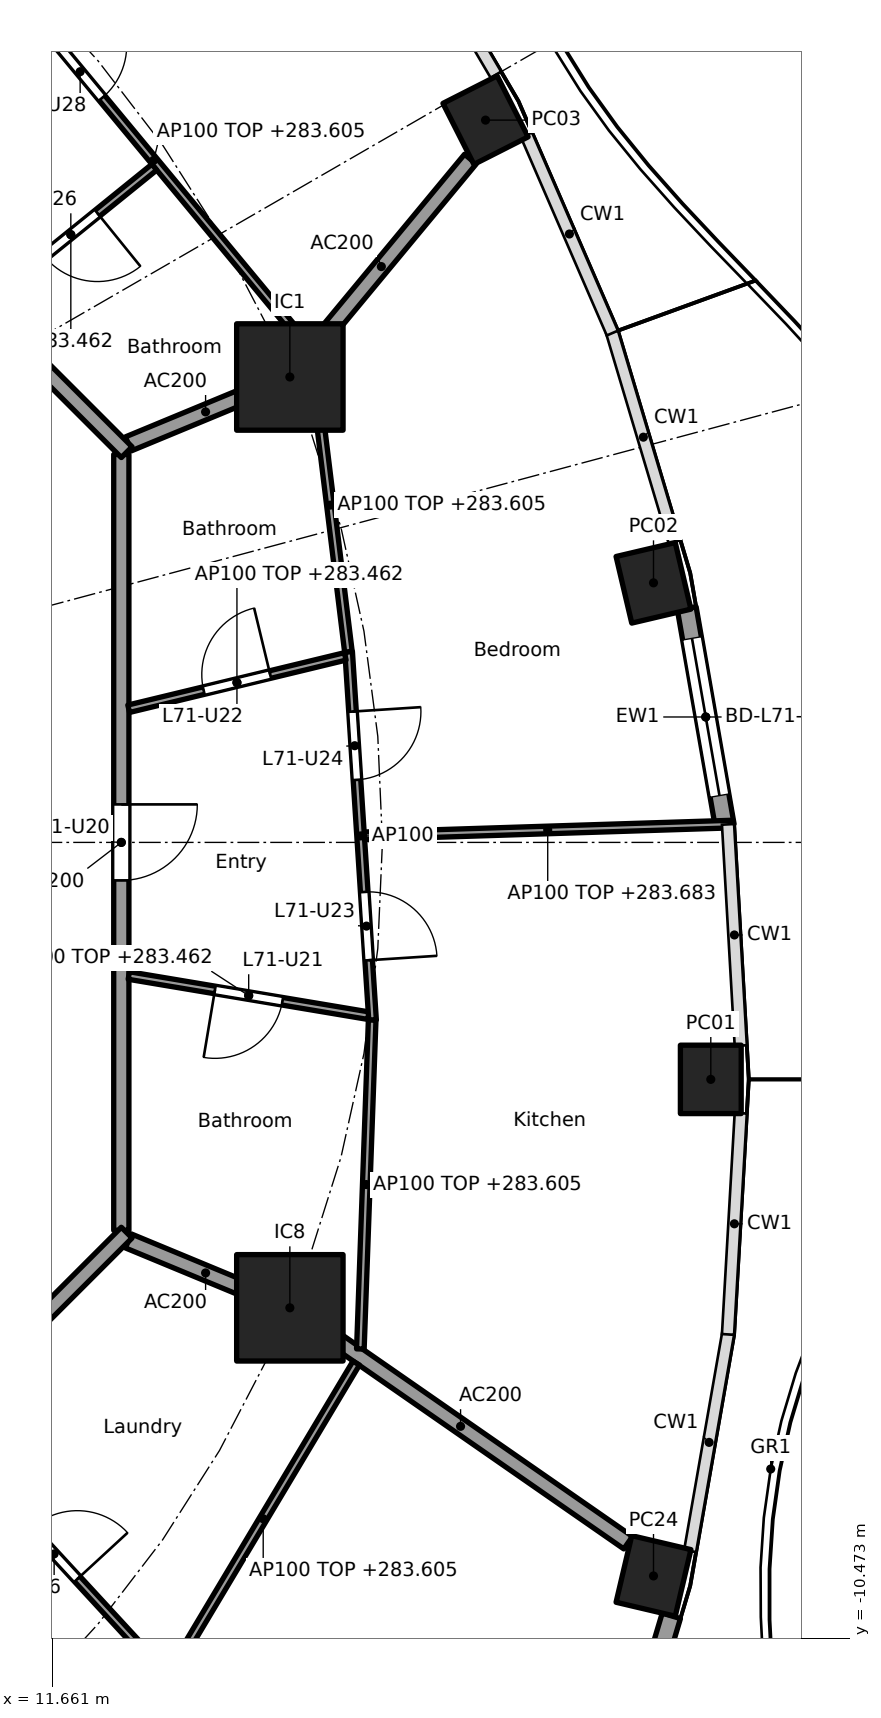
"""IFC4 building model, lengths in metres.
Left out: names, types, materials, properties, quantities, classifications, styles, units other than length and angle.
Written with IfcOpenShell. Run it as: python <this file> out.ifc"""

import sys

from ifc_helpers import new_model, si_unit, direction, frame, frame_2d, origin, origin_2d, place, context, subcontext, project, spatial, rectangle, hollow_rectangle, extrude, element, fill, save


model = new_model("IFC4")
c1 = context("Model", 3, precision=1e-05, world=origin(), true_north=direction((0.0, 1.0)))
c2 = subcontext(c1, "Body", "Model", "MODEL_VIEW")
j1 = project(units=[si_unit("LENGTHUNIT", "METRE"), si_unit("PLANEANGLEUNIT", "RADIAN")], contexts=[c1])
p1 = place(None, origin())
s1 = spatial("IfcSite", under=j1, at=p1, CompositionType="ELEMENT")
p2 = place(p1, origin())
s2 = spatial("IfcBuilding", under=s1, at=p2, CompositionType="ELEMENT")
p3 = place(p2, frame((0.0, 0.0, 280.7)))
s3 = spatial("IfcBuildingStorey", under=s2, at=p3, CompositionType="ELEMENT", Elevation=280.7)
for number, where, z_axis, x_axis in (
    (1, (20.32, -3.118, 0.0), (0.0, 0.0, 1.0), (0.0, 1.0, 0.0)),
    (2, (19.566, 3.415, 0.0), (0.0, 0.0, 1.0), (-0.229, 0.973, 0.0)),
    (3, (17.356, 9.502, 0.0), (0.0, 0.0, 1.0), (-0.452, 0.892, 0.0)),
    (4, (19.566, -9.65, 0.0), (0.0, 0.0, 1.0), (0.229, 0.973, 0.0)),
):
    element("IfcColumn", number, at=place(p3, frame(where, z_axis=z_axis, x_axis=x_axis)), inside=s3, PredefinedType="COLUMN", context=c2, shape_type="SweptSolid", body=[
        extrude(hollow_rectangle(XDim=0.9, YDim=0.8, WallThickness=0.028, at=origin_2d()), origin(), (0.0, 0.0, 1.0), 3.7),
    ])
for number, where, z_axis, x_axis in (
    (5, (14.782, 6.123, 0.0), (0.0, 0.0, 1.0), (1.0, 0.0, 0.0)),
    (6, (14.782, -6.123, 0.0), (0.0, 0.0, 1.0), (1.0, 0.0, 0.0)),
):
    element("IfcColumn", number, at=place(p3, frame(where, z_axis=z_axis, x_axis=x_axis)), inside=s3, PredefinedType="COLUMN", context=c2, shape_type="SweptSolid", body=[
        extrude(rectangle(XDim=1.4, YDim=1.4, at=origin_2d()), origin(), (0.0, 0.0, 1.0), 3.7),
    ])
p4 = place(p3, frame((20.004, 3.08, 0.0), z_axis=(0.0, 0.0, 1.0), x_axis=(0.172182411767, -0.985065082661, 0.0)))
e7 = element("IfcWall", 7, at=p4, inside=s3, PredefinedType="SOLIDWALL", context=c2, shape_type="SweptSolid", body=[
    extrude(rectangle(XDim=2.903, YDim=0.25, at=frame_2d((1.451, 0.0))), origin(), (0.0, 0.0, 1.0), 3.44),
])
p5 = place(p4, frame((0.401, 0.0, 0.0)))
e8 = element("IfcOpeningElement", 8, at=p5, cuts=e7, PredefinedType="OPENING", context=c2, shape_type="SweptSolid", body=[
    extrude(rectangle(XDim=2.1, YDim=2.4, at=frame_2d((1.05, 1.2))), frame((0.0, 0.135, 0.0), z_axis=(0.0, -1.0, 0.0), x_axis=(1.0, 0.0, 0.0)), (0.0, 0.0, 1.0), 0.27),
])
p6 = place(p3, frame((19.801, -10.175, 0.0), z_axis=(0.0, 0.0, 1.0), x_axis=(-0.285899456462, -0.958259620768, 0.0)))
e9 = element("IfcWall", 9, at=p6, inside=s3, PredefinedType="SOLIDWALL", context=c2, shape_type="SweptSolid", body=[
    extrude(rectangle(XDim=2.877, YDim=0.25, at=frame_2d((1.438, 0.0))), origin(), (0.0, 0.0, 1.0), 3.44),
])
p7 = place(p6, frame((0.389, 0.0, 0.0)))
e10 = element("IfcOpeningElement", 10, at=p7, cuts=e9, PredefinedType="OPENING", context=c2, shape_type="SweptSolid", body=[
    extrude(rectangle(XDim=2.1, YDim=2.4, at=frame_2d((1.05, 1.2))), frame((0.0, 0.135, 0.0), z_axis=(0.0, -1.0, 0.0), x_axis=(1.0, 0.0, 0.0)), (0.0, 0.0, 1.0), 0.27),
])
p8 = place(p3, frame((12.657, 5.243, 0.0), z_axis=(0.0, 0.0, 1.0), x_axis=(0.923853160736, 0.382747093259, 0.0)))
e11 = element("IfcWall", 11, at=p8, inside=s3, PredefinedType="PARTITIONING", context=c2, shape_type="SweptSolid", body=[
    extrude(rectangle(XDim=2.2, YDim=0.2, at=frame_2d((1.1, 0.0))), origin(), (0.0, 0.0, 1.0), 3.44),
])
p9 = place(p3, frame((14.814, 6.161, 0.0), z_axis=(0.0, 0.0, 1.0), x_axis=(0.638050520313, 0.769994502272, 0.0)))
e12 = element("IfcWall", 12, at=p9, inside=s3, PredefinedType="PARTITIONING", context=c2, shape_type="SweptSolid", body=[
    extrude(rectangle(XDim=3.673, YDim=0.2, at=frame_2d((1.836, 0.0))), origin(), (0.0, 0.0, 1.0), 3.44),
])
p10 = place(p3, frame((12.657, -5.243, 0.0), z_axis=(0.0, 0.0, 1.0), x_axis=(0.92383017907, -0.382802560388, 0.0)))
e13 = element("IfcWall", 13, at=p10, inside=s3, PredefinedType="PARTITIONING", context=c2, shape_type="SweptSolid", body=[
    extrude(rectangle(XDim=2.2, YDim=0.2, at=frame_2d((1.1, 0.0))), origin(), (0.0, 0.0, 1.0), 3.44),
])
p11 = place(p3, frame((14.823, -6.151, 0.0), z_axis=(0.0, 0.0, 1.0), x_axis=(0.821435065081, -0.570302054928, 0.0)))
e14 = element("IfcWall", 14, at=p11, inside=s3, PredefinedType="PARTITIONING", context=c2, shape_type="SweptSolid", body=[
    extrude(rectangle(XDim=5.368, YDim=0.2, at=frame_2d((2.684, 0.0))), origin(), (0.0, 0.0, 1.0), 3.44),
])
p12 = place(p3, frame((12.565, -5.104, 0.0), z_axis=(0.0, 0.0, 1.0), x_axis=(0.0, 1.0, 0.0)))
e15 = element("IfcWall", 15, at=p12, inside=s3, PredefinedType="PARTITIONING", context=c2, shape_type="SweptSolid", body=[
    extrude(rectangle(XDim=10.209, YDim=0.2, at=frame_2d((5.104, 0.0))), origin(), (0.0, 0.0, 1.0), 3.44),
])
p13 = place(p12, frame((4.604, 0.0, 0.0)))
e16 = element("IfcOpeningElement", 16, at=p13, cuts=e15, PredefinedType="OPENING", context=c2, shape_type="SweptSolid", body=[
    extrude(rectangle(XDim=1.0, YDim=2.1, at=frame_2d((0.5, 1.05))), frame((0.0, 0.11, 0.0), z_axis=(0.0, -1.0, 0.0), x_axis=(1.0, 0.0, 0.0)), (0.0, 0.0, 1.0), 0.22),
])
p14 = place(p3, frame((12.635, 5.134, 0.0), z_axis=(0.0, 0.0, 1.0), x_axis=(-0.707106781187, 0.707106781187, 0.0)))
e17 = element("IfcWall", 17, at=p14, inside=s3, PredefinedType="PARTITIONING", context=c2, shape_type="SweptSolid", body=[
    extrude(rectangle(XDim=10.609, YDim=0.2, at=frame_2d((5.305, 0.0))), origin(), (0.0, 0.0, 1.0), 3.44),
])
p15 = place(p14, frame((4.804, 0.0, 0.0)))
e18 = element("IfcOpeningElement", 18, at=p15, cuts=e17, PredefinedType="OPENING", context=c2, shape_type="SweptSolid", body=[
    extrude(rectangle(XDim=1.0, YDim=2.1, at=frame_2d((0.5, 1.05))), frame((0.0, 0.11, 0.0), z_axis=(0.0, -1.0, 0.0), x_axis=(1.0, 0.0, 0.0)), (0.0, 0.0, 1.0), 0.22),
])
p16 = place(p3, frame((5.275, -12.494, 0.0), z_axis=(0.0, 0.0, 1.0), x_axis=(0.707106781187, 0.707106781187, 0.0)))
e19 = element("IfcWall", 19, at=p16, inside=s3, PredefinedType="PARTITIONING", context=c2, shape_type="SweptSolid", body=[
    extrude(rectangle(XDim=10.409, YDim=0.2, at=frame_2d((5.205, 0.0))), origin(), (0.0, 0.0, 1.0), 3.44),
])
p17 = place(p16, frame((4.604, 0.0, 0.0)))
e20 = element("IfcOpeningElement", 20, at=p17, cuts=e19, PredefinedType="OPENING", context=c2, shape_type="SweptSolid", body=[
    extrude(rectangle(XDim=1.0, YDim=2.1, at=frame_2d((0.5, 1.05))), frame((0.0, 0.11, 0.0), z_axis=(0.0, -1.0, 0.0), x_axis=(1.0, 0.0, 0.0)), (0.0, 0.0, 1.0), 0.22),
])
p18 = place(p3, frame((12.663, -1.751, 0.0), z_axis=(0.0, 0.0, 1.0), x_axis=(0.98626156497, -0.165191178529, 0.0)))
e21 = element("IfcWall", 21, at=p18, inside=s3, PredefinedType="PARTITIONING", context=c2, shape_type="SweptSolid", body=[
    extrude(rectangle(XDim=3.198, YDim=0.1, at=frame_2d((1.599, 0.0))), origin(), (0.0, 0.0, 1.0), 2.762),
])
p19 = place(p18, frame((1.149, 0.0, 0.0)))
e22 = element("IfcOpeningElement", 22, at=p19, cuts=e21, PredefinedType="OPENING", context=c2, shape_type="SweptSolid", body=[
    extrude(rectangle(XDim=0.9, YDim=2.1, at=frame_2d((0.45, 1.05))), frame((0.0, 0.06, 0.0), z_axis=(0.0, -1.0, 0.0), x_axis=(1.0, 0.0, 0.0)), (0.0, 0.0, 1.0), 0.12),
])
p20 = place(p3, frame((15.87, -2.338, 0.0), z_axis=(0.0, 0.0, 1.0), x_axis=(-0.064797294757, 0.997898447034, 0.0)))
e23 = element("IfcWall", 23, at=p20, inside=s3, PredefinedType="PARTITIONING", context=c2, shape_type="SweptSolid", body=[
    extrude(rectangle(XDim=4.857, YDim=0.1, at=frame_2d((2.428, 0.0))), origin(), (0.0, 0.0, 1.0), 3.44),
])
p21 = place(p20, frame((0.789, 0.0, 0.0)))
e24 = element("IfcOpeningElement", 24, at=p21, cuts=e23, PredefinedType="OPENING", context=c2, shape_type="SweptSolid", body=[
    extrude(rectangle(XDim=0.9, YDim=2.1, at=frame_2d((0.45, 1.05))), frame((0.0, 0.06, 0.0), z_axis=(0.0, -1.0, 0.0), x_axis=(1.0, 0.0, 0.0)), (0.0, 0.0, 1.0), 0.12),
])
p22 = place(p20, frame((3.167, 0.0, 0.0)))
e25 = element("IfcOpeningElement", 25, at=p22, cuts=e23, PredefinedType="OPENING", context=c2, shape_type="SweptSolid", body=[
    extrude(rectangle(XDim=0.9, YDim=2.1, at=frame_2d((0.45, 1.05))), frame((0.0, 0.06, 0.0), z_axis=(0.0, -1.0, 0.0), x_axis=(1.0, 0.0, 0.0)), (0.0, 0.0, 1.0), 0.12),
])
p23 = place(p3, frame((15.865, -2.338, 0.0), z_axis=(0.0, 0.0, 1.0), x_axis=(-0.035864509465, -0.999356661538, 0.0)))
e26 = element("IfcWall", 26, at=p23, inside=s3, PredefinedType="PARTITIONING", context=c2, shape_type="SweptSolid", body=[
    extrude(rectangle(XDim=4.329, YDim=0.1, at=frame_2d((2.165, 0.0))), origin(), (0.0, 0.0, 1.0), 2.905),
])
p24 = place(p3, frame((15.763, 0.087, 0.0), z_axis=(0.0, 0.0, 1.0), x_axis=(0.999492034598, 0.03186962151, 0.0)))
e27 = element("IfcWall", 27, at=p24, inside=s3, PredefinedType="PARTITIONING", context=c2, shape_type="SweptSolid", body=[
    extrude(rectangle(XDim=4.826, YDim=0.1, at=frame_2d((2.413, 0.0))), origin(), (0.0, 0.0, 1.0), 2.983),
])
p25 = place(p3, frame((12.662, 1.758, 0.0), z_axis=(0.0, 0.0, 1.0), x_axis=(0.972004827836, 0.234960879007, 0.0)))
e28 = element("IfcWall", 28, at=p25, inside=s3, PredefinedType="PARTITIONING", context=c2, shape_type="SweptSolid", body=[
    extrude(rectangle(XDim=2.93, YDim=0.1, at=frame_2d((1.465, 0.0))), origin(), (0.0, 0.0, 1.0), 2.762),
])
p26 = place(p25, frame((1.015, 0.0, 0.0)))
e29 = element("IfcOpeningElement", 29, at=p26, cuts=e28, PredefinedType="OPENING", context=c2, shape_type="SweptSolid", body=[
    extrude(rectangle(XDim=0.9, YDim=2.1, at=frame_2d((0.45, 1.05))), frame((0.0, 0.06, 0.0), z_axis=(0.0, -1.0, 0.0), x_axis=(1.0, 0.0, 0.0)), (0.0, 0.0, 1.0), 0.12),
])
p27 = place(p3, frame((15.552, 2.508, 0.0), z_axis=(0.0, 0.0, 1.0), x_axis=(-0.12196293976, 0.992534654974, 0.0)))
e30 = element("IfcWall", 30, at=p27, inside=s3, PredefinedType="PARTITIONING", context=c2, shape_type="SweptSolid", body=[
    extrude(rectangle(XDim=3.887, YDim=0.1, at=frame_2d((1.944, 0.0))), origin(), (0.0, 0.0, 1.0), 2.905),
])
p28 = place(p3, frame((15.002, 6.543, 0.0), z_axis=(0.0, 0.0, 1.0), x_axis=(-0.637932656528, 0.770092154054, 0.0)))
e31 = element("IfcWall", 31, at=p28, inside=s3, PredefinedType="PARTITIONING", context=c2, shape_type="SweptSolid", body=[
    extrude(rectangle(XDim=6.311, YDim=0.1, at=frame_2d((3.155, 0.0))), origin(), (0.0, 0.0, 1.0), 2.905),
])
p29 = place(p28, frame((4.22, 0.0, 0.0)))
e32 = element("IfcOpeningElement", 32, at=p29, cuts=e31, PredefinedType="OPENING", context=c2, shape_type="SweptSolid", body=[
    extrude(rectangle(XDim=0.9, YDim=2.1, at=frame_2d((0.45, 1.05))), frame((0.0, 0.06, 0.0), z_axis=(0.0, -1.0, 0.0), x_axis=(1.0, 0.0, 0.0)), (0.0, 0.0, 1.0), 0.12),
])
p30 = place(p3, frame((10.802, 7.107, 0.0), z_axis=(0.0, 0.0, 1.0), x_axis=(0.777526610395, 0.628850037868, 0.0)))
e33 = element("IfcWall", 33, at=p30, inside=s3, PredefinedType="PARTITIONING", context=c2, shape_type="SweptSolid", body=[
    extrude(rectangle(XDim=2.824, YDim=0.1, at=frame_2d((1.412, 0.0))), origin(), (0.0, 0.0, 1.0), 2.762),
])
p31 = place(p30, frame((0.962, 0.0, 0.0)))
e34 = element("IfcOpeningElement", 34, at=p31, cuts=e33, PredefinedType="OPENING", context=c2, shape_type="SweptSolid", body=[
    extrude(rectangle(XDim=0.9, YDim=2.1, at=frame_2d((0.45, 1.05))), frame((0.0, 0.06, 0.0), z_axis=(0.0, -1.0, 0.0), x_axis=(1.0, 0.0, 0.0)), (0.0, 0.0, 1.0), 0.12),
])
p32 = place(p3, frame((7.708, -10.198, 0.0), z_axis=(0.0, 0.0, 1.0), x_axis=(0.503839015963, -0.863797572347, 0.0)))
e35 = element("IfcWall", 35, at=p32, inside=s3, PredefinedType="PARTITIONING", context=c2, shape_type="SweptSolid", body=[
    extrude(rectangle(XDim=11.856, YDim=0.1, at=frame_2d((5.928, 0.0))), origin(), (0.0, 0.0, 1.0), 2.762),
])
p33 = place(p32, frame((2.095, 0.0, 0.0)))
e36 = element("IfcOpeningElement", 36, at=p33, cuts=e35, PredefinedType="OPENING", context=c2, shape_type="SweptSolid", body=[
    extrude(rectangle(XDim=0.9, YDim=2.1, at=frame_2d((0.45, 1.05))), frame((0.0, 0.06, 0.0), z_axis=(0.0, -1.0, 0.0), x_axis=(1.0, 0.0, 0.0)), (0.0, 0.0, 1.0), 0.12),
])
p34 = place(p32, frame((8.023, 0.0, 0.0)))
e37 = element("IfcOpeningElement", 37, at=p34, cuts=e35, PredefinedType="OPENING", context=c2, shape_type="SweptSolid", body=[
    extrude(rectangle(XDim=0.9, YDim=2.1, at=frame_2d((0.45, 1.05))), frame((0.0, 0.06, 0.0), z_axis=(0.0, -1.0, 0.0), x_axis=(1.0, 0.0, 0.0)), (0.0, 0.0, 1.0), 0.12),
])
p35 = place(p3, frame((10.179, -7.731, 0.0), z_axis=(0.0, 0.0, 1.0), x_axis=(0.67775318564, -0.73528947997, 0.0)))
e38 = element("IfcWall", 38, at=p35, inside=s3, PredefinedType="PARTITIONING", context=c2, shape_type="SweptSolid", body=[
    extrude(rectangle(XDim=10.222, YDim=0.1, at=frame_2d((5.111, 0.0))), origin(), (0.0, 0.0, 1.0), 2.762),
])
p36 = place(p35, frame((1.766, 0.0, 0.0)))
e39 = element("IfcOpeningElement", 39, at=p36, cuts=e38, PredefinedType="OPENING", context=c2, shape_type="SweptSolid", body=[
    extrude(rectangle(XDim=0.9, YDim=2.1, at=frame_2d((0.45, 1.05))), frame((0.0, 0.06, 0.0), z_axis=(0.0, -1.0, 0.0), x_axis=(1.0, 0.0, 0.0)), (0.0, 0.0, 1.0), 0.12),
])
p37 = place(p35, frame((6.877, 0.0, 0.0)))
e40 = element("IfcOpeningElement", 40, at=p37, cuts=e38, PredefinedType="OPENING", context=c2, shape_type="SweptSolid", body=[
    extrude(rectangle(XDim=0.9, YDim=2.1, at=frame_2d((0.45, 1.05))), frame((0.0, 0.06, 0.0), z_axis=(0.0, -1.0, 0.0), x_axis=(1.0, 0.0, 0.0)), (0.0, 0.0, 1.0), 0.12),
])
p38 = place(p3, frame((13.208, -10.947, 0.0), z_axis=(0.0, 0.0, 1.0), x_axis=(0.512726452516, 0.858552028063, 0.0)))
e41 = element("IfcWall", 41, at=p38, inside=s3, PredefinedType="PARTITIONING", context=c2, shape_type="SweptSolid", body=[
    extrude(rectangle(XDim=4.772, YDim=0.1, at=frame_2d((2.386, 0.0))), origin(), (0.0, 0.0, 1.0), 2.905),
])
p39 = place(p5, origin())
e42 = element("IfcDoor", 42, at=p39, inside=s3, OperationType="SLIDING_TO_LEFT", PredefinedType="DOOR", context=c2, shape_type="SweptSolid", body=[
    extrude(rectangle(XDim=2.1, YDim=2.4, at=frame_2d((1.05, 1.2))), frame((0.0, 0.025, 0.0), z_axis=(0.0, -1.0, 0.0), x_axis=(1.0, 0.0, 0.0)), (0.0, 0.0, 1.0), 0.05),
])
fill(e8, e42)
p40 = place(p36, origin())
e43 = element("IfcDoor", 43, at=p40, inside=s3, OperationType="SINGLE_SWING_RIGHT", PredefinedType="DOOR", context=c2, shape_type="SweptSolid", body=[
    extrude(rectangle(XDim=0.9, YDim=2.1, at=frame_2d((0.45, 1.05))), frame((0.0, 0.025, 0.0), z_axis=(0.0, -1.0, 0.0), x_axis=(1.0, 0.0, 0.0)), (0.0, 0.0, 1.0), 0.05),
])
fill(e39, e43)
p41 = place(p13, frame((1.0, 0.0, 0.0), x_axis=(-1.0, 0.0, 0.0)))
e44 = element("IfcDoor", 44, at=p41, inside=s3, OperationType="SINGLE_SWING_LEFT", PredefinedType="DOOR", context=c2, shape_type="SweptSolid", body=[
    extrude(rectangle(XDim=1.0, YDim=2.1, at=frame_2d((0.5, 1.05))), frame((0.0, 0.025, 0.0), z_axis=(0.0, -1.0, 0.0), x_axis=(1.0, 0.0, 0.0)), (0.0, 0.0, 1.0), 0.05),
])
fill(e16, e44)
p42 = place(p19, frame((0.9, 0.0, 0.0), x_axis=(-1.0, 0.0, 0.0)))
e45 = element("IfcDoor", 45, at=p42, inside=s3, OperationType="SINGLE_SWING_RIGHT", PredefinedType="DOOR", context=c2, shape_type="SweptSolid", body=[
    extrude(rectangle(XDim=0.9, YDim=2.1, at=frame_2d((0.45, 1.05))), frame((0.0, 0.025, 0.0), z_axis=(0.0, -1.0, 0.0), x_axis=(1.0, 0.0, 0.0)), (0.0, 0.0, 1.0), 0.05),
])
fill(e22, e45)
p43 = place(p26, origin())
e46 = element("IfcDoor", 46, at=p43, inside=s3, OperationType="SINGLE_SWING_RIGHT", PredefinedType="DOOR", context=c2, shape_type="SweptSolid", body=[
    extrude(rectangle(XDim=0.9, YDim=2.1, at=frame_2d((0.45, 1.05))), frame((0.0, 0.025, 0.0), z_axis=(0.0, -1.0, 0.0), x_axis=(1.0, 0.0, 0.0)), (0.0, 0.0, 1.0), 0.05),
])
fill(e29, e46)
p44 = place(p21, frame((0.9, 0.0, 0.0), x_axis=(-1.0, 0.0, 0.0)))
e47 = element("IfcDoor", 47, at=p44, inside=s3, OperationType="SINGLE_SWING_RIGHT", PredefinedType="DOOR", context=c2, shape_type="SweptSolid", body=[
    extrude(rectangle(XDim=0.9, YDim=2.1, at=frame_2d((0.45, 1.05))), frame((0.0, 0.025, 0.0), z_axis=(0.0, -1.0, 0.0), x_axis=(1.0, 0.0, 0.0)), (0.0, 0.0, 1.0), 0.05),
])
fill(e24, e47)
p45 = place(p22, frame((0.9, 0.0, 0.0), x_axis=(-1.0, 0.0, 0.0)))
e48 = element("IfcDoor", 48, at=p45, inside=s3, OperationType="SINGLE_SWING_LEFT", PredefinedType="DOOR", context=c2, shape_type="SweptSolid", body=[
    extrude(rectangle(XDim=0.9, YDim=2.1, at=frame_2d((0.45, 1.05))), frame((0.0, 0.025, 0.0), z_axis=(0.0, -1.0, 0.0), x_axis=(1.0, 0.0, 0.0)), (0.0, 0.0, 1.0), 0.05),
])
fill(e25, e48)
p46 = place(p31, frame((0.9, 0.0, 0.0), x_axis=(-1.0, 0.0, 0.0)))
e49 = element("IfcDoor", 49, at=p46, inside=s3, OperationType="SINGLE_SWING_LEFT", PredefinedType="DOOR", context=c2, shape_type="SweptSolid", body=[
    extrude(rectangle(XDim=0.9, YDim=2.1, at=frame_2d((0.45, 1.05))), frame((0.0, 0.025, 0.0), z_axis=(0.0, -1.0, 0.0), x_axis=(1.0, 0.0, 0.0)), (0.0, 0.0, 1.0), 0.05),
])
fill(e34, e49)
p47 = place(p29, frame((0.9, 0.0, 0.0), x_axis=(-1.0, 0.0, 0.0)))
e50 = element("IfcDoor", 50, at=p47, inside=s3, OperationType="SINGLE_SWING_LEFT", PredefinedType="DOOR", context=c2, shape_type="SweptSolid", body=[
    extrude(rectangle(XDim=0.9, YDim=2.1, at=frame_2d((0.45, 1.05))), frame((0.0, 0.025, 0.0), z_axis=(0.0, -1.0, 0.0), x_axis=(1.0, 0.0, 0.0)), (0.0, 0.0, 1.0), 0.05),
])
fill(e32, e50)
save(model, sys.argv[1])
